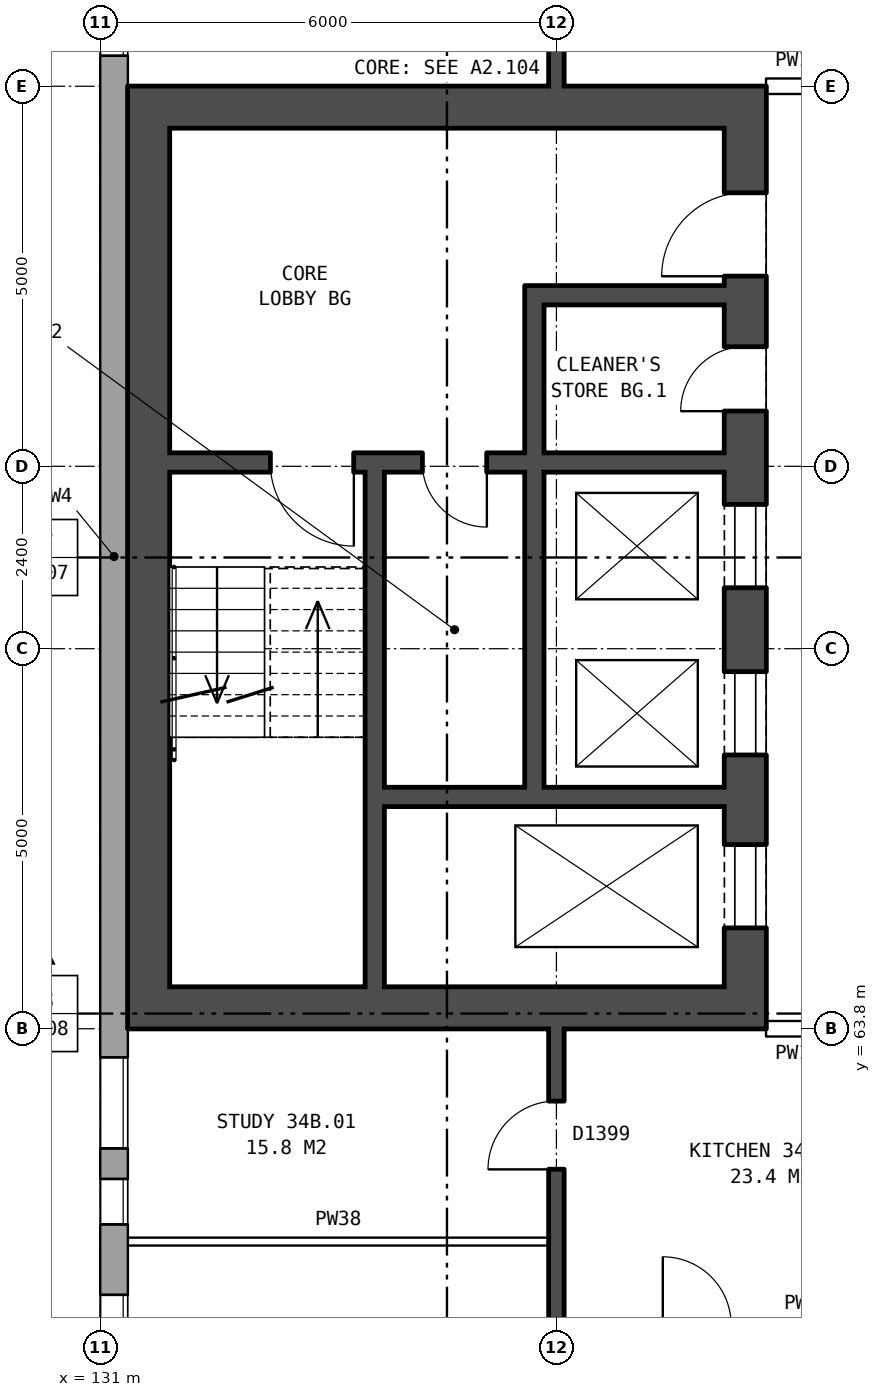
"""IFC4 building model, lengths in metres.
Left out: names, types, materials, properties, quantities, classifications, styles, units other than length and angle.
Written with IfcOpenShell. Run it as: python <this file> out.ifc"""

import sys

from ifc_helpers import new_model, si_unit, direction, frame, frame_2d, origin, place, context, subcontext, project, spatial, rectangle, extrude, element, fill, save


model = new_model("IFC4")
c1 = context("Model", 3, precision=1e-05, world=origin(), true_north=direction((0.0, 1.0)))
c2 = subcontext(c1, "Body", "Model", "MODEL_VIEW")
j1 = project(units=[si_unit("LENGTHUNIT", "METRE"), si_unit("PLANEANGLEUNIT", "RADIAN")], contexts=[c1])
p1 = place(None, origin())
s1 = spatial("IfcSite", under=j1, at=p1, CompositionType="ELEMENT")
p2 = place(p1, origin())
s2 = spatial("IfcBuilding", under=s1, at=p2, CompositionType="ELEMENT")
p3 = place(p2, frame((0.0, 0.0, 123.7)))
s3 = spatial("IfcBuildingStorey", under=s2, at=p3, CompositionType="ELEMENT", Elevation=123.7)
p4 = place(p3, frame((131.18, 82.925, 0.0), z_axis=(0.0, 0.0, 1.0), x_axis=(0.0, -1.0, 0.0)))
e1 = element("IfcWall", 1, at=p4, inside=s3, PredefinedType="STANDARD", context=c2, shape_type="SweptSolid", body=[
    extrude(rectangle(XDim=25.851, YDim=0.36, at=frame_2d((12.925, 0.0))), origin(), (0.0, 0.0, 1.0), 2.85),
])
p5 = place(p4, frame((1.625, 0.0, 0.8)))
e2 = element("IfcOpeningElement", 2, at=p5, cuts=e1, PredefinedType="OPENING", context=c2, shape_type="SweptSolid", body=[
    extrude(rectangle(XDim=1.6, YDim=1.8, at=frame_2d((0.8, 0.9))), frame((0.0, 0.19, 0.0), z_axis=(0.0, -1.0, 0.0), x_axis=(1.0, 0.0, 0.0)), (0.0, 0.0, 1.0), 0.38),
])
p6 = place(p4, frame((4.075, 0.0, 1.65)))
e3 = element("IfcOpeningElement", 3, at=p6, cuts=e1, PredefinedType="OPENING", context=c2, shape_type="SweptSolid", body=[
    extrude(rectangle(XDim=0.6, YDim=0.9, at=frame_2d((0.3, 0.45))), frame((0.0, 0.19, 0.0), z_axis=(0.0, -1.0, 0.0), x_axis=(1.0, 0.0, 0.0)), (0.0, 0.0, 1.0), 0.38),
])
p7 = place(p4, frame((19.5, 0.0, 0.35)))
e4 = element("IfcOpeningElement", 4, at=p7, cuts=e1, PredefinedType="OPENING", context=c2, shape_type="SweptSolid", body=[
    extrude(rectangle(XDim=1.2, YDim=0.9, at=frame_2d((0.6, 0.45))), frame((0.0, 0.19, 0.0), z_axis=(0.0, -1.0, 0.0), x_axis=(1.0, 0.0, 0.0)), (0.0, 0.0, 1.0), 0.38),
])
p8 = place(p4, frame((22.625, 0.0, 0.8)))
e5 = element("IfcOpeningElement", 5, at=p8, cuts=e1, PredefinedType="OPENING", context=c2, shape_type="SweptSolid", body=[
    extrude(rectangle(XDim=1.6, YDim=1.8, at=frame_2d((0.8, 0.9))), frame((0.0, 0.19, 0.0), z_axis=(0.0, -1.0, 0.0), x_axis=(1.0, 0.0, 0.0)), (0.0, 0.0, 1.0), 0.38),
])
p9 = place(p4, frame((5.125, 0.0, 0.35)))
e6 = element("IfcOpeningElement", 6, at=p9, cuts=e1, PredefinedType="OPENING", context=c2, shape_type="SweptSolid", body=[
    extrude(rectangle(XDim=1.2, YDim=0.9, at=frame_2d((0.6, 0.45))), frame((0.0, 0.19, 0.0), z_axis=(0.0, -1.0, 0.0), x_axis=(1.0, 0.0, 0.0)), (0.0, 0.0, 1.0), 0.38),
])
p10 = place(p4, frame((21.1, 0.0, 1.65)))
e7 = element("IfcOpeningElement", 7, at=p10, cuts=e1, PredefinedType="OPENING", context=c2, shape_type="SweptSolid", body=[
    extrude(rectangle(XDim=0.6, YDim=0.9, at=frame_2d((0.3, 0.45))), frame((0.0, 0.19, 0.0), z_axis=(0.0, -1.0, 0.0), x_axis=(1.0, 0.0, 0.0)), (0.0, 0.0, 1.0), 0.38),
])
p11 = place(p3, frame((139.485, 63.8, 0.0), z_axis=(0.0, 0.0, 1.0), x_axis=(0.0, 1.0, 0.0)))
e8 = element("IfcWall", 8, at=p11, inside=s3, PredefinedType="SHEAR", context=c2, shape_type="SweptSolid", body=[
    extrude(rectangle(XDim=12.4, YDim=0.55, at=frame_2d((6.2, 0.0))), origin(), (0.0, 0.0, 1.0), 2.85),
])
p12 = place(p11, frame((1.325, 0.0, 0.0)))
e9 = element("IfcOpeningElement", 9, at=p12, cuts=e8, PredefinedType="OPENING", context=c2, shape_type="SweptSolid", body=[
    extrude(rectangle(XDim=1.1, YDim=2.1, at=frame_2d((0.55, 1.05))), frame((0.0, 0.285, 0.0), z_axis=(0.0, -1.0, 0.0), x_axis=(1.0, 0.0, 0.0)), (0.0, 0.0, 1.0), 0.57),
])
p13 = place(p11, frame((3.6, 0.0, 0.0)))
e10 = element("IfcOpeningElement", 10, at=p13, cuts=e8, PredefinedType="OPENING", context=c2, shape_type="SweptSolid", body=[
    extrude(rectangle(XDim=1.1, YDim=2.1, at=frame_2d((0.55, 1.05))), frame((0.0, 0.285, 0.0), z_axis=(0.0, -1.0, 0.0), x_axis=(1.0, 0.0, 0.0)), (0.0, 0.0, 1.0), 0.57),
])
p14 = place(p11, frame((5.8, 0.0, 0.0)))
e11 = element("IfcOpeningElement", 11, at=p14, cuts=e8, PredefinedType="OPENING", context=c2, shape_type="SweptSolid", body=[
    extrude(rectangle(XDim=1.1, YDim=2.1, at=frame_2d((0.55, 1.05))), frame((0.0, 0.285, 0.0), z_axis=(0.0, -1.0, 0.0), x_axis=(1.0, 0.0, 0.0)), (0.0, 0.0, 1.0), 0.57),
])
p15 = place(p11, frame((9.9, 0.0, 0.0)))
e12 = element("IfcOpeningElement", 12, at=p15, cuts=e8, PredefinedType="OPENING", context=c2, shape_type="SweptSolid", body=[
    extrude(rectangle(XDim=1.1, YDim=2.1, at=frame_2d((0.55, 1.05))), frame((0.0, 0.285, 0.0), z_axis=(0.0, -1.0, 0.0), x_axis=(1.0, 0.0, 0.0)), (0.0, 0.0, 1.0), 0.57),
])
p16 = place(p11, frame((8.125, 0.0, 0.0)))
e13 = element("IfcOpeningElement", 13, at=p16, cuts=e8, PredefinedType="OPENING", context=c2, shape_type="SweptSolid", body=[
    extrude(rectangle(XDim=0.85, YDim=2.1, at=frame_2d((0.425, 1.05))), frame((0.0, 0.285, 0.0), z_axis=(0.0, -1.0, 0.0), x_axis=(1.0, 0.0, 0.0)), (0.0, 0.0, 1.0), 0.57),
])
p17 = place(p3, frame((131.635, 63.8, 0.0), z_axis=(0.0, 0.0, 1.0), x_axis=(0.0, 1.0, 0.0)))
e14 = element("IfcWall", 14, at=p17, inside=s3, PredefinedType="SHEAR", context=c2, shape_type="SweptSolid", body=[
    extrude(rectangle(XDim=12.4, YDim=0.55, at=frame_2d((6.2, 0.0))), origin(), (0.0, 0.0, 1.0), 2.85),
])
for number, where, z_axis, x_axis in (
    (15, (139.21, 64.075, 0.0), (0.0, 0.0, 1.0), (-1.0, 0.0, 0.0)),
    (16, (139.21, 75.925, 0.0), (0.0, 0.0, 1.0), (-1.0, 0.0, 0.0)),
):
    element("IfcWall", number, at=place(p3, frame(where, z_axis=z_axis, x_axis=x_axis)), inside=s3, PredefinedType="SHEAR", context=c2, shape_type="SweptSolid", body=[
        extrude(rectangle(XDim=7.3, YDim=0.55, at=frame_2d((3.65, 0.0))), origin(), (0.0, 0.0, 1.0), 2.85),
    ])
p18 = place(p3, frame((139.21, 66.85, 0.0), z_axis=(0.0, 0.0, 1.0), x_axis=(-1.0, 0.0, 0.0)))
e17 = element("IfcWall", 17, at=p18, inside=s3, PredefinedType="SHEAR", context=c2, shape_type="SweptSolid", body=[
    extrude(rectangle(XDim=4.475, YDim=0.25, at=frame_2d((2.237, 0.0))), origin(), (0.0, 0.0, 1.0), 2.85),
])
p19 = place(p3, frame((139.21, 71.25, 0.0), z_axis=(0.0, 0.0, 1.0), x_axis=(-1.0, 0.0, 0.0)))
e18 = element("IfcWall", 18, at=p19, inside=s3, PredefinedType="SHEAR", context=c2, shape_type="SweptSolid", body=[
    extrude(rectangle(XDim=7.3, YDim=0.25, at=frame_2d((3.65, 0.0))), origin(), (0.0, 0.0, 1.0), 2.85),
])
p20 = place(p19, frame((4.875, 0.0, 0.0)))
e19 = element("IfcOpeningElement", 19, at=p20, cuts=e18, PredefinedType="OPENING", context=c2, shape_type="SweptSolid", body=[
    extrude(rectangle(XDim=1.1, YDim=2.1, at=frame_2d((0.55, 1.05))), frame((0.0, 0.135, 0.0), z_axis=(0.0, -1.0, 0.0), x_axis=(1.0, 0.0, 0.0)), (0.0, 0.0, 1.0), 0.27),
])
p21 = place(p19, frame((3.125, 0.0, 0.0)))
e20 = element("IfcOpeningElement", 20, at=p21, cuts=e18, PredefinedType="OPENING", context=c2, shape_type="SweptSolid", body=[
    extrude(rectangle(XDim=0.85, YDim=2.1, at=frame_2d((0.425, 1.05))), frame((0.0, 0.135, 0.0), z_axis=(0.0, -1.0, 0.0), x_axis=(1.0, 0.0, 0.0)), (0.0, 0.0, 1.0), 0.27),
])
p22 = place(p3, frame((139.21, 73.45, 0.0), z_axis=(0.0, 0.0, 1.0), x_axis=(-1.0, 0.0, 0.0)))
e21 = element("IfcWall", 21, at=p22, inside=s3, PredefinedType="SHEAR", context=c2, shape_type="SweptSolid", body=[
    extrude(rectangle(XDim=2.375, YDim=0.25, at=frame_2d((1.188, 0.0))), origin(), (0.0, 0.0, 1.0), 2.85),
])
p23 = place(p3, frame((136.71, 66.975, 0.0), z_axis=(0.0, 0.0, 1.0), x_axis=(0.0, 1.0, 0.0)))
e22 = element("IfcWall", 22, at=p23, inside=s3, PredefinedType="SHEAR", context=c2, shape_type="SweptSolid", body=[
    extrude(rectangle(XDim=4.15, YDim=0.25, at=frame_2d((2.075, 0.0))), origin(), (0.0, 0.0, 1.0), 2.85),
])
p24 = place(p3, frame((136.71, 71.375, 0.0), z_axis=(0.0, 0.0, 1.0), x_axis=(0.0, 1.0, 0.0)))
e23 = element("IfcWall", 23, at=p24, inside=s3, PredefinedType="SHEAR", context=c2, shape_type="SweptSolid", body=[
    extrude(rectangle(XDim=2.2, YDim=0.25, at=frame_2d((1.1, 0.0))), origin(), (0.0, 0.0, 1.0), 2.85),
])
p25 = place(p3, frame((134.61, 64.35, 0.0), z_axis=(0.0, 0.0, 1.0), x_axis=(0.0, 1.0, 0.0)))
e24 = element("IfcWall", 24, at=p25, inside=s3, PredefinedType="SHEAR", context=c2, shape_type="SweptSolid", body=[
    extrude(rectangle(XDim=6.775, YDim=0.25, at=frame_2d((3.387, 0.0))), origin(), (0.0, 0.0, 1.0), 2.85),
])
p26 = place(p3, frame((131.36, 61.0, 0.0), z_axis=(0.0, 0.0, 1.0), x_axis=(1.0, 0.0, 0.0)))
e25 = element("IfcWall", 25, at=p26, inside=s3, PredefinedType="PARTITIONING", context=c2, shape_type="SweptSolid", body=[
    extrude(rectangle(XDim=5.54, YDim=0.1, at=frame_2d((2.77, 0.0))), origin(), (0.0, 0.0, 1.0), 2.85),
])
p27 = place(p3, frame((139.76, 63.8, 0.0), z_axis=(0.0, 0.0, 1.0), x_axis=(1.0, 0.0, 0.0)))
e26 = element("IfcWall", 26, at=p27, inside=s3, PredefinedType="PARTITIONING", context=c2, shape_type="SweptSolid", body=[
    extrude(rectangle(XDim=3.0, YDim=0.2, at=frame_2d((1.5, 0.0))), origin(), (0.0, 0.0, 1.0), 2.85),
])
p28 = place(p27, frame((1.0, 0.0, 0.0)))
e27 = element("IfcOpeningElement", 27, at=p28, cuts=e26, PredefinedType="OPENING", context=c2, shape_type="SweptSolid", body=[
    extrude(rectangle(XDim=1.0, YDim=2.1, at=frame_2d((0.5, 1.05))), frame((0.0, 0.11, 0.0), z_axis=(0.0, -1.0, 0.0), x_axis=(1.0, 0.0, 0.0)), (0.0, 0.0, 1.0), 0.22),
])
p29 = place(p3, frame((139.76, 76.2, 0.0), z_axis=(0.0, 0.0, 1.0), x_axis=(1.0, 0.0, 0.0)))
e28 = element("IfcWall", 28, at=p29, inside=s3, PredefinedType="PARTITIONING", context=c2, shape_type="SweptSolid", body=[
    extrude(rectangle(XDim=3.0, YDim=0.2, at=frame_2d((1.5, 0.0))), origin(), (0.0, 0.0, 1.0), 2.85),
])
p30 = place(p29, frame((1.0, 0.0, 0.0)))
e29 = element("IfcOpeningElement", 29, at=p30, cuts=e28, PredefinedType="OPENING", context=c2, shape_type="SweptSolid", body=[
    extrude(rectangle(XDim=1.0, YDim=2.1, at=frame_2d((0.5, 1.05))), frame((0.0, 0.11, 0.0), z_axis=(0.0, -1.0, 0.0), x_axis=(1.0, 0.0, 0.0)), (0.0, 0.0, 1.0), 0.22),
])
p31 = place(p3, frame((137.0, 54.36, 0.0), z_axis=(0.0, 0.0, 1.0), x_axis=(0.0, 1.0, 0.0)))
e30 = element("IfcWall", 30, at=p31, inside=s3, PredefinedType="SOLIDWALL", context=c2, shape_type="SweptSolid", body=[
    extrude(rectangle(XDim=9.44, YDim=0.2, at=frame_2d((4.72, 0.0))), origin(), (0.0, 0.0, 1.0), 2.85),
])
p32 = place(p31, frame((2.32, 0.0, 0.0)))
e31 = element("IfcOpeningElement", 31, at=p32, cuts=e30, PredefinedType="OPENING", context=c2, shape_type="SweptSolid", body=[
    extrude(rectangle(XDim=0.9, YDim=2.1, at=frame_2d((0.45, 1.05))), frame((0.0, 0.11, 0.0), z_axis=(0.0, -1.0, 0.0), x_axis=(1.0, 0.0, 0.0)), (0.0, 0.0, 1.0), 0.22),
])
p33 = place(p31, frame((7.59, 0.0, 0.0)))
e32 = element("IfcOpeningElement", 32, at=p33, cuts=e30, PredefinedType="OPENING", context=c2, shape_type="SweptSolid", body=[
    extrude(rectangle(XDim=0.9, YDim=2.1, at=frame_2d((0.45, 1.05))), frame((0.0, 0.11, 0.0), z_axis=(0.0, -1.0, 0.0), x_axis=(1.0, 0.0, 0.0)), (0.0, 0.0, 1.0), 0.22),
])
p34 = place(p3, frame((137.0, 76.2, 0.0), z_axis=(0.0, 0.0, 1.0), x_axis=(0.0, 1.0, 0.0)))
e33 = element("IfcWall", 33, at=p34, inside=s3, PredefinedType="SOLIDWALL", context=c2, shape_type="SweptSolid", body=[
    extrude(rectangle(XDim=9.44, YDim=0.2, at=frame_2d((4.72, 0.0))), origin(), (0.0, 0.0, 1.0), 2.85),
])
p35 = place(p34, frame((6.22, 0.0, 0.0)))
e34 = element("IfcOpeningElement", 34, at=p35, cuts=e33, PredefinedType="OPENING", context=c2, shape_type="SweptSolid", body=[
    extrude(rectangle(XDim=0.9, YDim=2.1, at=frame_2d((0.45, 1.05))), frame((0.0, 0.11, 0.0), z_axis=(0.0, -1.0, 0.0), x_axis=(1.0, 0.0, 0.0)), (0.0, 0.0, 1.0), 0.22),
])
p36 = place(p34, frame((0.95, 0.0, 0.0)))
e35 = element("IfcOpeningElement", 35, at=p36, cuts=e33, PredefinedType="OPENING", context=c2, shape_type="SweptSolid", body=[
    extrude(rectangle(XDim=0.9, YDim=2.1, at=frame_2d((0.45, 1.05))), frame((0.0, 0.11, 0.0), z_axis=(0.0, -1.0, 0.0), x_axis=(1.0, 0.0, 0.0)), (0.0, 0.0, 1.0), 0.22),
])
p37 = place(p7, origin())
e36 = element("IfcWindow", 36, at=p37, inside=s3, PartitioningType="SINGLE_PANEL", PredefinedType="WINDOW", context=c2, shape_type="SweptSolid", body=[
    extrude(rectangle(XDim=1.2, YDim=0.9, at=frame_2d((0.6, 0.45))), frame((0.0, 0.15, 0.0), z_axis=(0.0, -1.0, 0.0), x_axis=(1.0, 0.0, 0.0)), (0.0, 0.0, 1.0), 0.06),
])
fill(e4, e36)
p38 = place(p8, origin())
e37 = element("IfcWindow", 37, at=p38, inside=s3, PartitioningType="SINGLE_PANEL", PredefinedType="WINDOW", context=c2, shape_type="SweptSolid", body=[
    extrude(rectangle(XDim=1.6, YDim=1.8, at=frame_2d((0.8, 0.9))), frame((0.0, 0.15, 0.0), z_axis=(0.0, -1.0, 0.0), x_axis=(1.0, 0.0, 0.0)), (0.0, 0.0, 1.0), 0.06),
])
fill(e5, e37)
p39 = place(p12, origin())
e38 = element("IfcDoor", 38, at=p39, inside=s3, OperationType="DOUBLE_DOOR_SLIDING", PredefinedType="DOOR", context=c2, shape_type="SweptSolid", body=[
    extrude(rectangle(XDim=1.1, YDim=2.1, at=frame_2d((0.55, 1.05))), frame((0.0, 0.26, 0.0), z_axis=(0.0, -1.0, 0.0), x_axis=(1.0, 0.0, 0.0)), (0.0, 0.0, 1.0), 0.05),
])
fill(e9, e38)
p40 = place(p13, origin())
e39 = element("IfcDoor", 39, at=p40, inside=s3, OperationType="DOUBLE_DOOR_SLIDING", PredefinedType="DOOR", context=c2, shape_type="SweptSolid", body=[
    extrude(rectangle(XDim=1.1, YDim=2.1, at=frame_2d((0.55, 1.05))), frame((0.0, 0.26, 0.0), z_axis=(0.0, -1.0, 0.0), x_axis=(1.0, 0.0, 0.0)), (0.0, 0.0, 1.0), 0.05),
])
fill(e10, e39)
p41 = place(p14, origin())
e40 = element("IfcDoor", 40, at=p41, inside=s3, OperationType="DOUBLE_DOOR_SLIDING", PredefinedType="DOOR", context=c2, shape_type="SweptSolid", body=[
    extrude(rectangle(XDim=1.1, YDim=2.1, at=frame_2d((0.55, 1.05))), frame((0.0, 0.26, 0.0), z_axis=(0.0, -1.0, 0.0), x_axis=(1.0, 0.0, 0.0)), (0.0, 0.0, 1.0), 0.05),
])
fill(e11, e40)
p42 = place(p15, origin())
e41 = element("IfcDoor", 41, at=p42, inside=s3, OperationType="SINGLE_SWING_LEFT", PredefinedType="DOOR", context=c2, shape_type="SweptSolid", body=[
    extrude(rectangle(XDim=1.1, YDim=2.1, at=frame_2d((0.55, 1.05))), frame((0.0, 0.26, 0.0), z_axis=(0.0, -1.0, 0.0), x_axis=(1.0, 0.0, 0.0)), (0.0, 0.0, 1.0), 0.05),
])
fill(e12, e41)
p43 = place(p20, origin())
e42 = element("IfcDoor", 42, at=p43, inside=s3, OperationType="SINGLE_SWING_LEFT", PredefinedType="DOOR", context=c2, shape_type="SweptSolid", body=[
    extrude(rectangle(XDim=1.1, YDim=2.1, at=frame_2d((0.55, 1.05))), frame((0.0, 0.025, 0.0), z_axis=(0.0, -1.0, 0.0), x_axis=(1.0, 0.0, 0.0)), (0.0, 0.0, 1.0), 0.05),
])
fill(e19, e42)
p44 = place(p16, origin())
e43 = element("IfcDoor", 43, at=p44, inside=s3, OperationType="SINGLE_SWING_LEFT", PredefinedType="DOOR", context=c2, shape_type="SweptSolid", body=[
    extrude(rectangle(XDim=0.85, YDim=2.1, at=frame_2d((0.425, 1.05))), frame((0.0, 0.26, 0.0), z_axis=(0.0, -1.0, 0.0), x_axis=(1.0, 0.0, 0.0)), (0.0, 0.0, 1.0), 0.05),
])
fill(e13, e43)
p45 = place(p21, origin())
e44 = element("IfcDoor", 44, at=p45, inside=s3, OperationType="SINGLE_SWING_LEFT", PredefinedType="DOOR", context=c2, shape_type="SweptSolid", body=[
    extrude(rectangle(XDim=0.85, YDim=2.1, at=frame_2d((0.425, 1.05))), frame((0.0, 0.025, 0.0), z_axis=(0.0, -1.0, 0.0), x_axis=(1.0, 0.0, 0.0)), (0.0, 0.0, 1.0), 0.05),
])
fill(e20, e44)
p46 = place(p33, origin())
e45 = element("IfcDoor", 45, at=p46, inside=s3, OperationType="SINGLE_SWING_LEFT", PredefinedType="DOOR", context=c2, shape_type="SweptSolid", body=[
    extrude(rectangle(XDim=0.9, YDim=2.1, at=frame_2d((0.45, 1.05))), frame((0.0, 0.025, 0.0), z_axis=(0.0, -1.0, 0.0), x_axis=(1.0, 0.0, 0.0)), (0.0, 0.0, 1.0), 0.05),
])
fill(e32, e45)
p47 = place(p9, origin())
e46 = element("IfcWindow", 46, at=p47, inside=s3, PartitioningType="SINGLE_PANEL", PredefinedType="WINDOW", context=c2, shape_type="SweptSolid", body=[
    extrude(rectangle(XDim=1.2, YDim=0.9, at=frame_2d((0.6, 0.45))), frame((0.0, 0.15, 0.0), z_axis=(0.0, -1.0, 0.0), x_axis=(1.0, 0.0, 0.0)), (0.0, 0.0, 1.0), 0.06),
])
fill(e6, e46)
p48 = place(p10, origin())
e47 = element("IfcWindow", 47, at=p48, inside=s3, PartitioningType="SINGLE_PANEL", PredefinedType="WINDOW", context=c2, shape_type="SweptSolid", body=[
    extrude(rectangle(XDim=0.6, YDim=0.9, at=frame_2d((0.3, 0.45))), frame((0.0, 0.15, 0.0), z_axis=(0.0, -1.0, 0.0), x_axis=(1.0, 0.0, 0.0)), (0.0, 0.0, 1.0), 0.06),
])
fill(e7, e47)
save(model, sys.argv[1])
